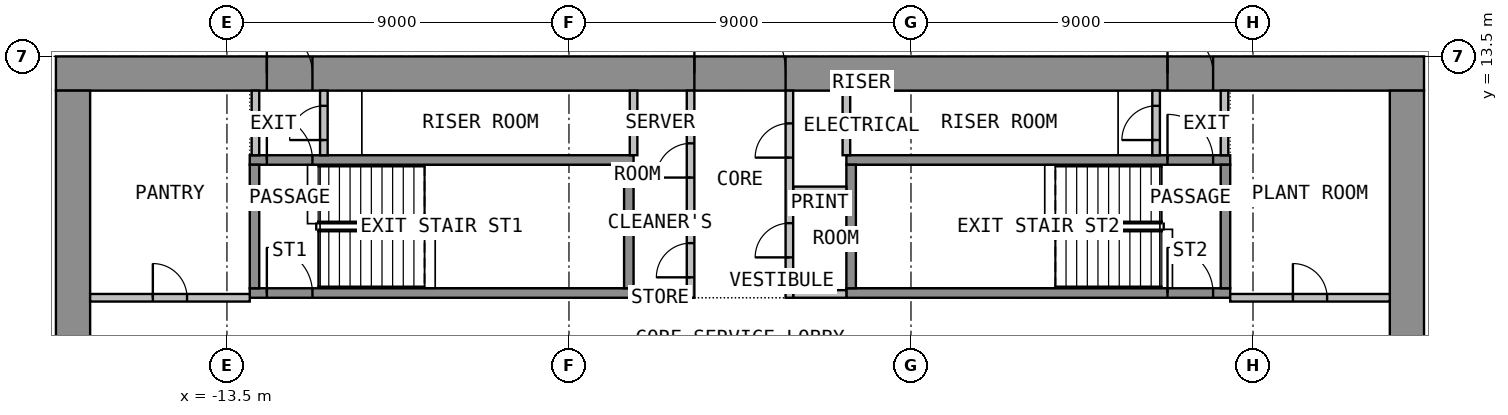
"""IFC4 building model, lengths in metres.
Left out: names, types, materials, properties, quantities, classifications, styles, units other than length and angle.
Written with IfcOpenShell. Run it as: python <this file> out.ifc"""

import sys

from ifc_helpers import new_model, si_unit, direction, frame, frame_2d, origin, place, context, subcontext, project, spatial, rectangle, extrude, element, fill, save


model = new_model("IFC4")
c1 = context("Model", 3, precision=1e-05, world=origin(), true_north=direction((0.0, 1.0)))
c2 = subcontext(c1, "Body", "Model", "MODEL_VIEW")
j1 = project(units=[si_unit("LENGTHUNIT", "METRE"), si_unit("PLANEANGLEUNIT", "RADIAN")], contexts=[c1])
p1 = place(None, origin())
s1 = spatial("IfcSite", under=j1, at=p1, CompositionType="ELEMENT")
p2 = place(p1, origin())
s2 = spatial("IfcBuilding", under=s1, at=p2, CompositionType="ELEMENT")
p3 = place(p2, frame((0.0, 0.0, 30.0)))
s3 = spatial("IfcBuildingStorey", under=s2, at=p3, CompositionType="ELEMENT", Elevation=30.0)
p4 = place(p3, frame((-18.0, 13.05, 0.0), z_axis=(0.0, 0.0, 1.0), x_axis=(1.0, 0.0, 0.0)))
e1 = element("IfcWall", 1, at=p4, inside=s3, PredefinedType="SHEAR", context=c2, shape_type="SweptSolid", body=[
    extrude(rectangle(XDim=36.0, YDim=0.9, at=frame_2d((18.0, 0.0))), origin(), (0.0, 0.0, 1.0), 3.525),
])
p5 = place(p4, frame((16.8, 0.0, 0.0)))
e2 = element("IfcOpeningElement", 2, at=p5, cuts=e1, PredefinedType="OPENING", context=c2, shape_type="SweptSolid", body=[
    extrude(rectangle(XDim=2.4, YDim=2.1, at=frame_2d((1.2, 1.05))), frame((0.0, 0.46, 0.0), z_axis=(0.0, -1.0, 0.0), x_axis=(1.0, 0.0, 0.0)), (0.0, 0.0, 1.0), 0.92),
])
p6 = place(p4, frame((5.55, 0.0, 0.0)))
e3 = element("IfcOpeningElement", 3, at=p6, cuts=e1, PredefinedType="OPENING", context=c2, shape_type="SweptSolid", body=[
    extrude(rectangle(XDim=1.2, YDim=2.1, at=frame_2d((0.6, 1.05))), frame((0.0, 0.46, 0.0), z_axis=(0.0, -1.0, 0.0), x_axis=(1.0, 0.0, 0.0)), (0.0, 0.0, 1.0), 0.92),
])
p7 = place(p4, frame((29.25, 0.0, 0.0)))
e4 = element("IfcOpeningElement", 4, at=p7, cuts=e1, PredefinedType="OPENING", context=c2, shape_type="SweptSolid", body=[
    extrude(rectangle(XDim=1.2, YDim=2.1, at=frame_2d((0.6, 1.05))), frame((0.0, 0.46, 0.0), z_axis=(0.0, -1.0, 0.0), x_axis=(1.0, 0.0, 0.0)), (0.0, 0.0, 1.0), 0.92),
])
p8 = place(p3, frame((-17.55, -12.6, 0.0), z_axis=(0.0, 0.0, 1.0), x_axis=(0.0, 1.0, 0.0)))
e5 = element("IfcWall", 5, at=p8, inside=s3, PredefinedType="SHEAR", context=c2, shape_type="SweptSolid", body=[
    extrude(rectangle(XDim=25.2, YDim=0.9, at=frame_2d((12.6, 0.0))), origin(), (0.0, 0.0, 1.0), 3.525),
])
p9 = place(p8, frame((11.4, 0.0, 0.0)))
e6 = element("IfcOpeningElement", 6, at=p9, cuts=e5, PredefinedType="OPENING", context=c2, shape_type="SweptSolid", body=[
    extrude(rectangle(XDim=2.4, YDim=2.1, at=frame_2d((1.2, 1.05))), frame((0.0, 0.46, 0.0), z_axis=(0.0, -1.0, 0.0), x_axis=(1.0, 0.0, 0.0)), (0.0, 0.0, 1.0), 0.92),
])
p10 = place(p3, frame((17.55, -12.6, 0.0), z_axis=(0.0, 0.0, 1.0), x_axis=(0.0, 1.0, 0.0)))
e7 = element("IfcWall", 7, at=p10, inside=s3, PredefinedType="SHEAR", context=c2, shape_type="SweptSolid", body=[
    extrude(rectangle(XDim=25.2, YDim=0.9, at=frame_2d((12.6, 0.0))), origin(), (0.0, 0.0, 1.0), 3.525),
])
p11 = place(p10, frame((11.4, 0.0, 0.0)))
e8 = element("IfcOpeningElement", 8, at=p11, cuts=e7, PredefinedType="OPENING", context=c2, shape_type="SweptSolid", body=[
    extrude(rectangle(XDim=2.4, YDim=2.1, at=frame_2d((1.2, 1.05))), frame((0.0, 0.46, 0.0), z_axis=(0.0, -1.0, 0.0), x_axis=(1.0, 0.0, 0.0)), (0.0, 0.0, 1.0), 0.92),
])
p12 = place(p3, frame((-12.9, 7.275, 0.0), z_axis=(0.0, 0.0, 1.0), x_axis=(1.0, 0.0, 0.0)))
e9 = element("IfcWall", 9, at=p12, inside=s3, PredefinedType="SHEAR", context=c2, shape_type="SweptSolid", body=[
    extrude(rectangle(XDim=10.1, YDim=0.25, at=frame_2d((5.05, 0.0))), origin(), (0.0, 0.0, 1.0), 3.525),
])
p13 = place(p12, frame((0.45, 0.0, 0.0)))
e10 = element("IfcOpeningElement", 10, at=p13, cuts=e9, PredefinedType="OPENING", context=c2, shape_type="SweptSolid", body=[
    extrude(rectangle(XDim=1.2, YDim=2.1, at=frame_2d((0.6, 1.05))), frame((0.0, 0.135, 0.0), z_axis=(0.0, -1.0, 0.0), x_axis=(1.0, 0.0, 0.0)), (0.0, 0.0, 1.0), 0.27),
])
p14 = place(p3, frame((-12.9, 10.775, 0.0), z_axis=(0.0, 0.0, 1.0), x_axis=(1.0, 0.0, 0.0)))
e11 = element("IfcWall", 11, at=p14, inside=s3, PredefinedType="SHEAR", context=c2, shape_type="SweptSolid", body=[
    extrude(rectangle(XDim=10.1, YDim=0.25, at=frame_2d((5.05, 0.0))), origin(), (0.0, 0.0, 1.0), 3.525),
])
p15 = place(p14, frame((0.45, 0.0, 0.0)))
e12 = element("IfcOpeningElement", 12, at=p15, cuts=e11, PredefinedType="OPENING", context=c2, shape_type="SweptSolid", body=[
    extrude(rectangle(XDim=1.2, YDim=2.1, at=frame_2d((0.6, 1.05))), frame((0.0, 0.135, 0.0), z_axis=(0.0, -1.0, 0.0), x_axis=(1.0, 0.0, 0.0)), (0.0, 0.0, 1.0), 0.27),
])
for number, where, z_axis, x_axis in (
    (13, (-12.775, 7.4, 0.0), (0.0, 0.0, 1.0), (0.0, 1.0, 0.0)),
    (14, (-2.925, 7.4, 0.0), (0.0, 0.0, 1.0), (0.0, 1.0, 0.0)),
):
    element("IfcWall", number, at=place(p3, frame(where, z_axis=z_axis, x_axis=x_axis)), inside=s3, PredefinedType="SHEAR", context=c2, shape_type="SweptSolid", body=[
        extrude(rectangle(XDim=3.25, YDim=0.25, at=frame_2d((1.625, 0.0))), origin(), (0.0, 0.0, 1.0), 3.525),
    ])
p16 = place(p3, frame((2.8, 7.275, 0.0), z_axis=(0.0, 0.0, 1.0), x_axis=(1.0, 0.0, 0.0)))
e15 = element("IfcWall", 15, at=p16, inside=s3, PredefinedType="SHEAR", context=c2, shape_type="SweptSolid", body=[
    extrude(rectangle(XDim=10.1, YDim=0.25, at=frame_2d((5.05, 0.0))), origin(), (0.0, 0.0, 1.0), 3.525),
])
p17 = place(p16, frame((8.45, 0.0, 0.0)))
e16 = element("IfcOpeningElement", 16, at=p17, cuts=e15, PredefinedType="OPENING", context=c2, shape_type="SweptSolid", body=[
    extrude(rectangle(XDim=1.2, YDim=2.1, at=frame_2d((0.6, 1.05))), frame((0.0, 0.135, 0.0), z_axis=(0.0, -1.0, 0.0), x_axis=(1.0, 0.0, 0.0)), (0.0, 0.0, 1.0), 0.27),
])
p18 = place(p3, frame((2.8, 10.775, 0.0), z_axis=(0.0, 0.0, 1.0), x_axis=(1.0, 0.0, 0.0)))
e17 = element("IfcWall", 17, at=p18, inside=s3, PredefinedType="SHEAR", context=c2, shape_type="SweptSolid", body=[
    extrude(rectangle(XDim=10.1, YDim=0.25, at=frame_2d((5.05, 0.0))), origin(), (0.0, 0.0, 1.0), 3.525),
])
p19 = place(p18, frame((8.45, 0.0, 0.0)))
e18 = element("IfcOpeningElement", 18, at=p19, cuts=e17, PredefinedType="OPENING", context=c2, shape_type="SweptSolid", body=[
    extrude(rectangle(XDim=1.2, YDim=2.1, at=frame_2d((0.6, 1.05))), frame((0.0, 0.135, 0.0), z_axis=(0.0, -1.0, 0.0), x_axis=(1.0, 0.0, 0.0)), (0.0, 0.0, 1.0), 0.27),
])
for number, where, z_axis, x_axis in (
    (19, (2.925, 7.4, 0.0), (0.0, 0.0, 1.0), (0.0, 1.0, 0.0)),
    (20, (12.775, 7.4, 0.0), (0.0, 0.0, 1.0), (0.0, 1.0, 0.0)),
):
    element("IfcWall", number, at=place(p3, frame(where, z_axis=z_axis, x_axis=x_axis)), inside=s3, PredefinedType="SHEAR", context=c2, shape_type="SweptSolid", body=[
        extrude(rectangle(XDim=3.25, YDim=0.25, at=frame_2d((1.625, 0.0))), origin(), (0.0, 0.0, 1.0), 3.525),
    ])
for number, where, z_axis, x_axis in (
    (21, (-2.8, 7.25, 0.0), (0.0, 0.0, 1.0), (1.0, 0.0, 0.0)),
    (22, (-2.8, 8.925, 0.0), (0.0, 0.0, 1.0), (1.0, 0.0, 0.0)),
    (23, (1.4, 7.25, 0.0), (0.0, 0.0, 1.0), (1.0, 0.0, 0.0)),
    (24, (1.4, 9.975, 0.0), (0.0, 0.0, 1.0), (1.0, 0.0, 0.0)),
):
    element("IfcWall", number, at=place(p3, frame(where, z_axis=z_axis, x_axis=x_axis)), inside=s3, PredefinedType="PARTITIONING", context=c2, shape_type="SweptSolid", body=[
        extrude(rectangle(XDim=1.4, YDim=0.2, at=frame_2d((0.7, 0.0))), origin(), (0.0, 0.0, 1.0), 3.525),
    ])
p20 = place(p3, frame((-1.3, 7.15, 0.0), z_axis=(0.0, 0.0, 1.0), x_axis=(0.0, 1.0, 0.0)))
e25 = element("IfcWall", 25, at=p20, inside=s3, PredefinedType="PARTITIONING", context=c2, shape_type="SweptSolid", body=[
    extrude(rectangle(XDim=5.45, YDim=0.2, at=frame_2d((2.725, 0.0))), origin(), (0.0, 0.0, 1.0), 3.525),
])
p21 = place(p20, frame((0.538, 0.0, 0.0)))
e26 = element("IfcOpeningElement", 26, at=p21, cuts=e25, PredefinedType="OPENING", context=c2, shape_type="SweptSolid", body=[
    extrude(rectangle(XDim=0.9, YDim=2.1, at=frame_2d((0.45, 1.05))), frame((0.0, 0.11, 0.0), z_axis=(0.0, -1.0, 0.0), x_axis=(1.0, 0.0, 0.0)), (0.0, 0.0, 1.0), 0.22),
])
p22 = place(p20, frame((3.163, 0.0, 0.0)))
e27 = element("IfcOpeningElement", 27, at=p22, cuts=e25, PredefinedType="OPENING", context=c2, shape_type="SweptSolid", body=[
    extrude(rectangle(XDim=0.9, YDim=2.1, at=frame_2d((0.45, 1.05))), frame((0.0, 0.11, 0.0), z_axis=(0.0, -1.0, 0.0), x_axis=(1.0, 0.0, 0.0)), (0.0, 0.0, 1.0), 0.22),
])
p23 = place(p3, frame((1.3, 7.15, 0.0), z_axis=(0.0, 0.0, 1.0), x_axis=(0.0, 1.0, 0.0)))
e28 = element("IfcWall", 28, at=p23, inside=s3, PredefinedType="PARTITIONING", context=c2, shape_type="SweptSolid", body=[
    extrude(rectangle(XDim=5.45, YDim=0.2, at=frame_2d((2.725, 0.0))), origin(), (0.0, 0.0, 1.0), 3.525),
])
p24 = place(p23, frame((1.062, 0.0, 0.0)))
e29 = element("IfcOpeningElement", 29, at=p24, cuts=e28, PredefinedType="OPENING", context=c2, shape_type="SweptSolid", body=[
    extrude(rectangle(XDim=0.9, YDim=2.1, at=frame_2d((0.45, 1.05))), frame((0.0, 0.11, 0.0), z_axis=(0.0, -1.0, 0.0), x_axis=(1.0, 0.0, 0.0)), (0.0, 0.0, 1.0), 0.22),
])
p25 = place(p23, frame((3.688, 0.0, 0.0)))
e30 = element("IfcOpeningElement", 30, at=p25, cuts=e28, PredefinedType="OPENING", context=c2, shape_type="SweptSolid", body=[
    extrude(rectangle(XDim=0.9, YDim=2.1, at=frame_2d((0.45, 1.05))), frame((0.0, 0.11, 0.0), z_axis=(0.0, -1.0, 0.0), x_axis=(1.0, 0.0, 0.0)), (0.0, 0.0, 1.0), 0.22),
])
p26 = place(p3, frame((-12.75, 10.9, 0.0), z_axis=(0.0, 0.0, 1.0), x_axis=(0.0, 1.0, 0.0)))
e31 = element("IfcWall", 31, at=p26, inside=s3, PredefinedType="PARTITIONING", context=c2, shape_type="SweptSolid", body=[
    extrude(rectangle(XDim=1.7, YDim=0.2, at=frame_2d((0.85, 0.0))), origin(), (0.0, 0.0, 1.0), 3.525),
])
p27 = place(p3, frame((-10.95, 10.9, 0.0), z_axis=(0.0, 0.0, 1.0), x_axis=(0.0, 1.0, 0.0)))
e32 = element("IfcWall", 32, at=p27, inside=s3, PredefinedType="PARTITIONING", context=c2, shape_type="SweptSolid", body=[
    extrude(rectangle(XDim=1.7, YDim=0.2, at=frame_2d((0.85, 0.0))), origin(), (0.0, 0.0, 1.0), 3.525),
])
p28 = place(p27, frame((0.4, 0.0, 0.0)))
e33 = element("IfcOpeningElement", 33, at=p28, cuts=e32, PredefinedType="OPENING", context=c2, shape_type="SweptSolid", body=[
    extrude(rectangle(XDim=0.9, YDim=2.1, at=frame_2d((0.45, 1.05))), frame((0.0, 0.11, 0.0), z_axis=(0.0, -1.0, 0.0), x_axis=(1.0, 0.0, 0.0)), (0.0, 0.0, 1.0), 0.22),
])
p29 = place(p3, frame((12.75, 10.9, 0.0), z_axis=(0.0, 0.0, 1.0), x_axis=(0.0, 1.0, 0.0)))
e34 = element("IfcWall", 34, at=p29, inside=s3, PredefinedType="PARTITIONING", context=c2, shape_type="SweptSolid", body=[
    extrude(rectangle(XDim=1.7, YDim=0.2, at=frame_2d((0.85, 0.0))), origin(), (0.0, 0.0, 1.0), 3.525),
])
p30 = place(p3, frame((10.95, 10.9, 0.0), z_axis=(0.0, 0.0, 1.0), x_axis=(0.0, 1.0, 0.0)))
e35 = element("IfcWall", 35, at=p30, inside=s3, PredefinedType="PARTITIONING", context=c2, shape_type="SweptSolid", body=[
    extrude(rectangle(XDim=1.7, YDim=0.2, at=frame_2d((0.85, 0.0))), origin(), (0.0, 0.0, 1.0), 3.525),
])
p31 = place(p30, frame((0.4, 0.0, 0.0)))
e36 = element("IfcOpeningElement", 36, at=p31, cuts=e35, PredefinedType="OPENING", context=c2, shape_type="SweptSolid", body=[
    extrude(rectangle(XDim=0.9, YDim=2.1, at=frame_2d((0.45, 1.05))), frame((0.0, 0.11, 0.0), z_axis=(0.0, -1.0, 0.0), x_axis=(1.0, 0.0, 0.0)), (0.0, 0.0, 1.0), 0.22),
])
p32 = place(p3, frame((-17.1, 7.15, 0.0), z_axis=(0.0, 0.0, 1.0), x_axis=(1.0, 0.0, 0.0)))
e37 = element("IfcWall", 37, at=p32, inside=s3, PredefinedType="PARTITIONING", context=c2, shape_type="SweptSolid", body=[
    extrude(rectangle(XDim=4.2, YDim=0.2, at=frame_2d((2.1, 0.0))), origin(), (0.0, 0.0, 1.0), 3.525),
])
p33 = place(p32, frame((1.65, 0.0, 0.0)))
e38 = element("IfcOpeningElement", 38, at=p33, cuts=e37, PredefinedType="OPENING", context=c2, shape_type="SweptSolid", body=[
    extrude(rectangle(XDim=0.9, YDim=2.1, at=frame_2d((0.45, 1.05))), frame((0.0, 0.11, 0.0), z_axis=(0.0, -1.0, 0.0), x_axis=(1.0, 0.0, 0.0)), (0.0, 0.0, 1.0), 0.22),
])
p34 = place(p3, frame((12.9, 7.15, 0.0), z_axis=(0.0, 0.0, 1.0), x_axis=(1.0, 0.0, 0.0)))
e39 = element("IfcWall", 39, at=p34, inside=s3, PredefinedType="PARTITIONING", context=c2, shape_type="SweptSolid", body=[
    extrude(rectangle(XDim=4.2, YDim=0.2, at=frame_2d((2.1, 0.0))), origin(), (0.0, 0.0, 1.0), 3.525),
])
p35 = place(p34, frame((1.65, 0.0, 0.0)))
e40 = element("IfcOpeningElement", 40, at=p35, cuts=e39, PredefinedType="OPENING", context=c2, shape_type="SweptSolid", body=[
    extrude(rectangle(XDim=0.9, YDim=2.1, at=frame_2d((0.45, 1.05))), frame((0.0, 0.11, 0.0), z_axis=(0.0, -1.0, 0.0), x_axis=(1.0, 0.0, 0.0)), (0.0, 0.0, 1.0), 0.22),
])
for number, where, z_axis, x_axis in (
    (41, (-2.8, 10.901, 0.0), (0.0, 0.0, 1.0), (0.0, 1.0, 0.0)),
    (42, (2.8, 10.901, 0.0), (0.0, 0.0, 1.0), (0.0, 1.0, 0.0)),
):
    element("IfcWall", number, at=place(p3, frame(where, z_axis=z_axis, x_axis=x_axis)), inside=s3, PredefinedType="PARTITIONING", context=c2, shape_type="SweptSolid", body=[
        extrude(rectangle(XDim=1.698, YDim=0.2, at=frame_2d((0.849, 0.0))), origin(), (0.0, 0.0, 1.0), 3.525),
    ])
p36 = place(p5, origin())
e43 = element("IfcDoor", 43, at=p36, inside=s3, OperationType="DOUBLE_DOOR_DOUBLE_SWING", PredefinedType="DOOR", context=c2, shape_type="SweptSolid", body=[
    extrude(rectangle(XDim=2.4, YDim=2.1, at=frame_2d((1.2, 1.05))), frame((0.0, 0.025, 0.0), z_axis=(0.0, -1.0, 0.0), x_axis=(1.0, 0.0, 0.0)), (0.0, 0.0, 1.0), 0.05),
])
fill(e2, e43)
p37 = place(p6, origin())
e44 = element("IfcDoor", 44, at=p37, inside=s3, OperationType="SINGLE_SWING_RIGHT", PredefinedType="DOOR", context=c2, shape_type="SweptSolid", body=[
    extrude(rectangle(XDim=1.2, YDim=2.1, at=frame_2d((0.6, 1.05))), frame((0.0, 0.025, 0.0), z_axis=(0.0, -1.0, 0.0), x_axis=(1.0, 0.0, 0.0)), (0.0, 0.0, 1.0), 0.05),
])
fill(e3, e44)
p38 = place(p7, origin())
e45 = element("IfcDoor", 45, at=p38, inside=s3, OperationType="SINGLE_SWING_RIGHT", PredefinedType="DOOR", context=c2, shape_type="SweptSolid", body=[
    extrude(rectangle(XDim=1.2, YDim=2.1, at=frame_2d((0.6, 1.05))), frame((0.0, 0.025, 0.0), z_axis=(0.0, -1.0, 0.0), x_axis=(1.0, 0.0, 0.0)), (0.0, 0.0, 1.0), 0.05),
])
fill(e4, e45)
p39 = place(p13, origin())
e46 = element("IfcDoor", 46, at=p39, inside=s3, OperationType="SINGLE_SWING_LEFT", PredefinedType="DOOR", context=c2, shape_type="SweptSolid", body=[
    extrude(rectangle(XDim=1.2, YDim=2.1, at=frame_2d((0.6, 1.05))), frame((0.0, 0.025, 0.0), z_axis=(0.0, -1.0, 0.0), x_axis=(1.0, 0.0, 0.0)), (0.0, 0.0, 1.0), 0.05),
])
fill(e10, e46)
p40 = place(p17, origin())
e47 = element("IfcDoor", 47, at=p40, inside=s3, OperationType="SINGLE_SWING_LEFT", PredefinedType="DOOR", context=c2, shape_type="SweptSolid", body=[
    extrude(rectangle(XDim=1.2, YDim=2.1, at=frame_2d((0.6, 1.05))), frame((0.0, 0.025, 0.0), z_axis=(0.0, -1.0, 0.0), x_axis=(1.0, 0.0, 0.0)), (0.0, 0.0, 1.0), 0.05),
])
fill(e16, e47)
p41 = place(p21, origin())
e48 = element("IfcDoor", 48, at=p41, inside=s3, OperationType="SINGLE_SWING_LEFT", PredefinedType="DOOR", context=c2, shape_type="SweptSolid", body=[
    extrude(rectangle(XDim=0.9, YDim=2.1, at=frame_2d((0.45, 1.05))), frame((0.0, 0.025, 0.0), z_axis=(0.0, -1.0, 0.0), x_axis=(1.0, 0.0, 0.0)), (0.0, 0.0, 1.0), 0.05),
])
fill(e26, e48)
p42 = place(p22, origin())
e49 = element("IfcDoor", 49, at=p42, inside=s3, OperationType="SINGLE_SWING_LEFT", PredefinedType="DOOR", context=c2, shape_type="SweptSolid", body=[
    extrude(rectangle(XDim=0.9, YDim=2.1, at=frame_2d((0.45, 1.05))), frame((0.0, 0.025, 0.0), z_axis=(0.0, -1.0, 0.0), x_axis=(1.0, 0.0, 0.0)), (0.0, 0.0, 1.0), 0.05),
])
fill(e27, e49)
p43 = place(p24, origin())
e50 = element("IfcDoor", 50, at=p43, inside=s3, OperationType="SINGLE_SWING_LEFT", PredefinedType="DOOR", context=c2, shape_type="SweptSolid", body=[
    extrude(rectangle(XDim=0.9, YDim=2.1, at=frame_2d((0.45, 1.05))), frame((0.0, 0.025, 0.0), z_axis=(0.0, -1.0, 0.0), x_axis=(1.0, 0.0, 0.0)), (0.0, 0.0, 1.0), 0.05),
])
fill(e29, e50)
p44 = place(p25, origin())
e51 = element("IfcDoor", 51, at=p44, inside=s3, OperationType="SINGLE_SWING_LEFT", PredefinedType="DOOR", context=c2, shape_type="SweptSolid", body=[
    extrude(rectangle(XDim=0.9, YDim=2.1, at=frame_2d((0.45, 1.05))), frame((0.0, 0.025, 0.0), z_axis=(0.0, -1.0, 0.0), x_axis=(1.0, 0.0, 0.0)), (0.0, 0.0, 1.0), 0.05),
])
fill(e30, e51)
p45 = place(p15, origin())
e52 = element("IfcDoor", 52, at=p45, inside=s3, OperationType="SINGLE_SWING_RIGHT", PredefinedType="DOOR", context=c2, shape_type="SweptSolid", body=[
    extrude(rectangle(XDim=1.2, YDim=2.1, at=frame_2d((0.6, 1.05))), frame((0.0, 0.025, 0.0), z_axis=(0.0, -1.0, 0.0), x_axis=(1.0, 0.0, 0.0)), (0.0, 0.0, 1.0), 0.05),
])
fill(e12, e52)
p46 = place(p28, origin())
e53 = element("IfcDoor", 53, at=p46, inside=s3, OperationType="SINGLE_SWING_LEFT", PredefinedType="DOOR", context=c2, shape_type="SweptSolid", body=[
    extrude(rectangle(XDim=0.9, YDim=2.1, at=frame_2d((0.45, 1.05))), frame((0.0, 0.025, 0.0), z_axis=(0.0, -1.0, 0.0), x_axis=(1.0, 0.0, 0.0)), (0.0, 0.0, 1.0), 0.05),
])
fill(e33, e53)
p47 = place(p19, origin())
e54 = element("IfcDoor", 54, at=p47, inside=s3, OperationType="SINGLE_SWING_RIGHT", PredefinedType="DOOR", context=c2, shape_type="SweptSolid", body=[
    extrude(rectangle(XDim=1.2, YDim=2.1, at=frame_2d((0.6, 1.05))), frame((0.0, 0.025, 0.0), z_axis=(0.0, -1.0, 0.0), x_axis=(1.0, 0.0, 0.0)), (0.0, 0.0, 1.0), 0.05),
])
fill(e18, e54)
p48 = place(p31, origin())
e55 = element("IfcDoor", 55, at=p48, inside=s3, OperationType="SINGLE_SWING_LEFT", PredefinedType="DOOR", context=c2, shape_type="SweptSolid", body=[
    extrude(rectangle(XDim=0.9, YDim=2.1, at=frame_2d((0.45, 1.05))), frame((0.0, 0.025, 0.0), z_axis=(0.0, -1.0, 0.0), x_axis=(1.0, 0.0, 0.0)), (0.0, 0.0, 1.0), 0.05),
])
fill(e36, e55)
p49 = place(p33, origin())
e56 = element("IfcDoor", 56, at=p49, inside=s3, OperationType="SINGLE_SWING_LEFT", PredefinedType="DOOR", context=c2, shape_type="SweptSolid", body=[
    extrude(rectangle(XDim=0.9, YDim=2.1, at=frame_2d((0.45, 1.05))), frame((0.0, 0.025, 0.0), z_axis=(0.0, -1.0, 0.0), x_axis=(1.0, 0.0, 0.0)), (0.0, 0.0, 1.0), 0.05),
])
fill(e38, e56)
p50 = place(p35, origin())
e57 = element("IfcDoor", 57, at=p50, inside=s3, OperationType="SINGLE_SWING_LEFT", PredefinedType="DOOR", context=c2, shape_type="SweptSolid", body=[
    extrude(rectangle(XDim=0.9, YDim=2.1, at=frame_2d((0.45, 1.05))), frame((0.0, 0.025, 0.0), z_axis=(0.0, -1.0, 0.0), x_axis=(1.0, 0.0, 0.0)), (0.0, 0.0, 1.0), 0.05),
])
fill(e40, e57)
save(model, sys.argv[1])
